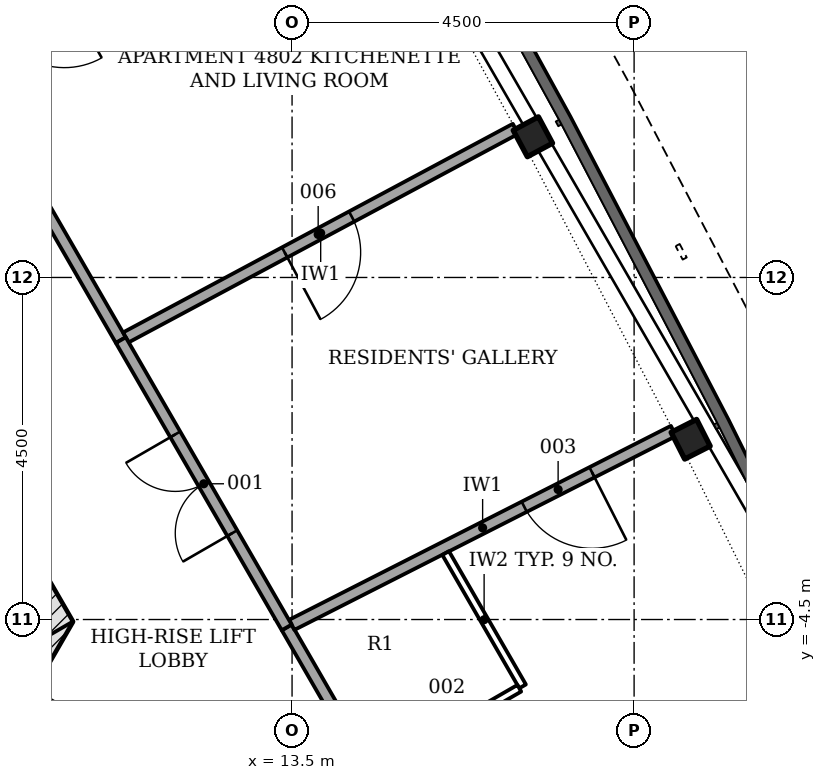
"""IFC4 building model, lengths in metres.
Left out: names, types, materials, properties, quantities, classifications, styles, units other than length and angle.
Written with IfcOpenShell. Run it as: python <this file> out.ifc"""

import sys

from ifc_helpers import new_model, si_unit, direction, frame, frame_2d, origin, origin_2d, place, context, subcontext, project, spatial, rectangle, i_section, extrude, element, fill, save


model = new_model("IFC4")
c1 = context("Model", 3, precision=1e-05, world=origin(), true_north=direction((0.0, 1.0)))
c2 = subcontext(c1, "Body", "Model", "MODEL_VIEW")
j1 = project(units=[si_unit("LENGTHUNIT", "METRE"), si_unit("PLANEANGLEUNIT", "RADIAN")], contexts=[c1])
p1 = place(None, origin())
s1 = spatial("IfcSite", under=j1, at=p1, CompositionType="ELEMENT")
p2 = place(p1, origin())
s2 = spatial("IfcBuilding", under=s1, at=p2, CompositionType="ELEMENT")
p3 = place(p2, frame((0.0, 0.0, 188.7)))
s3 = spatial("IfcBuildingStorey", under=s2, at=p3, CompositionType="ELEMENT", Elevation=188.7)
p4 = place(p3, frame((8.926, -6.753, -0.2), z_axis=(0.0, 0.0, 1.0), x_axis=(0.500042739161, 0.866000726912, 0.0)))
e1 = element("IfcWall", 1, at=p4, inside=s3, PredefinedType="SHEAR", context=c2, shape_type="SweptSolid", body=[
    extrude(rectangle(XDim=2.771, YDim=0.7, at=frame_2d((1.386, 0.0))), origin(), (0.0, 0.0, 1.0), 3.6),
])
p5 = place(p3, frame((10.311, -4.703, -0.2), z_axis=(0.0, 0.0, 1.0), x_axis=(-0.500001446645, 0.866024568562, 0.0)))
e2 = element("IfcWall", 2, at=p5, inside=s3, PredefinedType="SHEAR", context=c2, shape_type="SweptSolid", body=[
    extrude(rectangle(XDim=18.458, YDim=0.7, at=frame_2d((9.229, 0.0))), origin(), (0.0, 0.0, 1.0), 3.6),
])
p6 = place(p5, frame((4.379, 0.0, 0.2)))
e3 = element("IfcOpeningElement", 3, at=p6, cuts=e2, PredefinedType="OPENING", context=c2, shape_type="SweptSolid", body=[
    extrude(rectangle(XDim=1.1, YDim=2.1, at=frame_2d((0.55, 1.05))), frame((0.0, 0.36, 0.0), z_axis=(0.0, -1.0, 0.0), x_axis=(1.0, 0.0, 0.0)), (0.0, 0.0, 1.0), 0.72),
])
p7 = place(p5, frame((6.529, 0.0, 0.2)))
e4 = element("IfcOpeningElement", 4, at=p7, cuts=e2, PredefinedType="OPENING", context=c2, shape_type="SweptSolid", body=[
    extrude(rectangle(XDim=1.1, YDim=2.1, at=frame_2d((0.55, 1.05))), frame((0.0, 0.36, 0.0), z_axis=(0.0, -1.0, 0.0), x_axis=(1.0, 0.0, 0.0)), (0.0, 0.0, 1.0), 0.72),
])
p8 = place(p5, frame((8.679, 0.0, 0.2)))
e5 = element("IfcOpeningElement", 5, at=p8, cuts=e2, PredefinedType="OPENING", context=c2, shape_type="SweptSolid", body=[
    extrude(rectangle(XDim=1.1, YDim=2.1, at=frame_2d((0.55, 1.05))), frame((0.0, 0.36, 0.0), z_axis=(0.0, -1.0, 0.0), x_axis=(1.0, 0.0, 0.0)), (0.0, 0.0, 1.0), 0.72),
])
p9 = place(p5, frame((10.829, 0.0, 0.2)))
e6 = element("IfcOpeningElement", 6, at=p9, cuts=e2, PredefinedType="OPENING", context=c2, shape_type="SweptSolid", body=[
    extrude(rectangle(XDim=1.1, YDim=2.1, at=frame_2d((0.55, 1.05))), frame((0.0, 0.36, 0.0), z_axis=(0.0, -1.0, 0.0), x_axis=(1.0, 0.0, 0.0)), (0.0, 0.0, 1.0), 0.72),
])
p10 = place(p5, frame((12.979, 0.0, 0.2)))
e7 = element("IfcOpeningElement", 7, at=p10, cuts=e2, PredefinedType="OPENING", context=c2, shape_type="SweptSolid", body=[
    extrude(rectangle(XDim=1.1, YDim=2.1, at=frame_2d((0.55, 1.05))), frame((0.0, 0.36, 0.0), z_axis=(0.0, -1.0, 0.0), x_axis=(1.0, 0.0, 0.0)), (0.0, 0.0, 1.0), 0.72),
])
p11 = place(p3, frame((9.922, -5.728, -0.2), z_axis=(0.0, 0.0, 1.0), x_axis=(0.866025463095, -0.499999897272, 0.0)))
e8 = element("IfcWall", 8, at=p11, inside=s3, PredefinedType="SHEAR", context=c2, shape_type="SweptSolid", body=[
    extrude(rectangle(XDim=9.521, YDim=0.7, at=frame_2d((4.761, 0.0))), origin(), (0.0, 0.0, 1.0), 3.6),
])
for number, where, z_axis, x_axis in (
    (9, (18.744, -2.128, -0.2), (0.0, 0.0, 1.0), (-0.453, 0.892, 0.0)),
    (10, (16.668, 1.851, -0.2), (0.0, 0.0, 1.0), (-0.472, 0.882, 0.0)),
):
    element("IfcColumn", number, at=place(p3, frame(where, z_axis=z_axis, x_axis=x_axis)), inside=s3, PredefinedType="COLUMN", context=c2, shape_type="SweptSolid", body=[
        extrude(i_section(OverallWidth=0.394, OverallDepth=0.376, WebThickness=0.017, FlangeThickness=0.028, FilletRadius=0.015, at=origin_2d()), origin(), (0.0, 0.0, 1.0), 3.6),
    ])
p12 = place(p3, frame((15.807, -8.722, 0.0), z_axis=(0.0, 0.0, 1.0), x_axis=(-0.500015802937, 0.866016279763, 0.0)))
e11 = element("IfcWall", 11, at=p12, inside=s3, PredefinedType="PARTITIONING", context=c2, shape_type="SweptSolid", body=[
    extrude(rectangle(XDim=4.755, YDim=0.15, at=frame_2d((2.377, 0.0))), origin(), (0.0, 0.0, 1.0), 2.923),
])
p13 = place(p3, frame((11.247, -0.824, 0.0), z_axis=(0.0, 0.0, 1.0), x_axis=(-0.499997921847, 0.866026603603, 0.0)))
e12 = element("IfcWall", 12, at=p13, inside=s3, PredefinedType="PARTITIONING", context=c2, shape_type="SweptSolid", body=[
    extrude(rectangle(XDim=14.065, YDim=0.15, at=frame_2d((7.032, 0.0))), origin(), (0.0, 0.0, 1.0), 2.852),
])
p14 = place(p13, frame((11.953, 0.0, 0.0)))
e13 = element("IfcOpeningElement", 13, at=p14, cuts=e12, PredefinedType="OPENING", context=c2, shape_type="SweptSolid", body=[
    extrude(rectangle(XDim=1.0, YDim=2.1, at=frame_2d((0.5, 1.05))), frame((0.0, 0.085, 0.0), z_axis=(0.0, -1.0, 0.0), x_axis=(1.0, 0.0, 0.0)), (0.0, 0.0, 1.0), 0.17),
])
p15 = place(p3, frame((18.518, -2.019, 0.0), z_axis=(0.0, 0.0, 1.0), x_axis=(-0.891548029597, -0.452926164978, 0.0)))
e14 = element("IfcWall", 14, at=p15, inside=s3, PredefinedType="PARTITIONING", context=c2, shape_type="SweptSolid", body=[
    extrude(rectangle(XDim=5.632, YDim=0.15, at=frame_2d((2.816, 0.0))), origin(), (0.0, 0.0, 1.0), 2.461),
])
p16 = place(p15, frame((1.202, 0.0, 0.0)))
e15 = element("IfcOpeningElement", 15, at=p16, cuts=e14, PredefinedType="OPENING", context=c2, shape_type="SweptSolid", body=[
    extrude(rectangle(XDim=1.0, YDim=2.1, at=frame_2d((0.5, 1.05))), frame((0.0, 0.085, 0.0), z_axis=(0.0, -1.0, 0.0), x_axis=(1.0, 0.0, 0.0)), (0.0, 0.0, 1.0), 0.17),
])
p17 = place(p3, frame((16.44, 1.956, 0.0), z_axis=(0.0, 0.0, 1.0), x_axis=(-0.881627849584, -0.471945266783, 0.0)))
e16 = element("IfcWall", 16, at=p17, inside=s3, PredefinedType="PARTITIONING", context=c2, shape_type="SweptSolid", body=[
    extrude(rectangle(XDim=5.815, YDim=0.15, at=frame_2d((2.907, 0.0))), origin(), (0.0, 0.0, 1.0), 2.461),
])
p18 = place(p17, frame((2.445, 0.0, 0.0)))
e17 = element("IfcOpeningElement", 17, at=p18, cuts=e16, PredefinedType="OPENING", context=c2, shape_type="SweptSolid", body=[
    extrude(rectangle(XDim=1.0, YDim=2.1, at=frame_2d((0.5, 1.05))), frame((0.0, 0.085, 0.0), z_axis=(0.0, -1.0, 0.0), x_axis=(1.0, 0.0, 0.0)), (0.0, 0.0, 1.0), 0.17),
])
p19 = place(p3, frame((13.429, -4.604, 0.0), z_axis=(0.0, 0.0, 1.0), x_axis=(-0.499995208485, 0.866028170149, 0.0)))
e18 = element("IfcWall", 18, at=p19, inside=s3, PredefinedType="PARTITIONING", context=c2, shape_type="SweptSolid", body=[
    extrude(rectangle(XDim=4.365, YDim=0.15, at=frame_2d((2.182, 0.0))), origin(), (0.0, 0.0, 1.0), 2.852),
])
p20 = place(p19, frame((1.432, 0.0, 0.0)))
e19 = element("IfcOpeningElement", 19, at=p20, cuts=e18, PredefinedType="OPENING", context=c2, shape_type="SweptSolid", body=[
    extrude(rectangle(XDim=1.5, YDim=2.1, at=frame_2d((0.75, 1.05))), frame((0.0, 0.085, 0.0), z_axis=(0.0, -1.0, 0.0), x_axis=(1.0, 0.0, 0.0)), (0.0, 0.0, 1.0), 0.17),
])
p21 = place(p3, frame((15.521, -3.626, 0.0), z_axis=(0.0, 0.0, 1.0), x_axis=(0.500042536776, -0.866000843773, 0.0)))
e20 = element("IfcWall", 20, at=p21, inside=s3, PredefinedType="PARTITIONING", context=c2, shape_type="SweptSolid", body=[
    extrude(rectangle(XDim=2.025, YDim=0.1, at=frame_2d((1.012, 0.0))), origin(), (0.0, 0.0, 1.0), 3.4),
])
p22 = place(p3, frame((16.49, -5.405, 0.0), z_axis=(0.0, 0.0, 1.0), x_axis=(-0.866065968399, -0.499929733443, 0.0)))
e21 = element("IfcWall", 21, at=p22, inside=s3, PredefinedType="PARTITIONING", context=c2, shape_type="SweptSolid", body=[
    extrude(rectangle(XDim=2.175, YDim=0.1, at=frame_2d((1.087, 0.0))), origin(), (0.0, 0.0, 1.0), 3.4),
])
p23 = place(p22, frame((0.6, 0.0, 0.0)))
e22 = element("IfcOpeningElement", 22, at=p23, cuts=e21, PredefinedType="OPENING", context=c2, shape_type="SweptSolid", body=[
    extrude(rectangle(XDim=1.0, YDim=2.1, at=frame_2d((0.5, 1.05))), frame((0.0, 0.06, 0.0), z_axis=(0.0, -1.0, 0.0), x_axis=(1.0, 0.0, 0.0)), (0.0, 0.0, 1.0), 0.12),
])
p24 = place(p3, frame((14.277, 5.885, 0.0), z_axis=(0.0, 0.0, 1.0), x_axis=(-0.871335785584, -0.490687220907, 0.0)))
e23 = element("IfcWall", 23, at=p24, inside=s3, PredefinedType="PARTITIONING", context=c2, shape_type="SweptSolid", body=[
    extrude(rectangle(XDim=5.904, YDim=0.1, at=frame_2d((2.952, 0.0))), origin(), (0.0, 0.0, 1.0), 2.461),
])
p25 = place(p24, frame((1.339, 0.0, 0.0)))
e24 = element("IfcOpeningElement", 24, at=p25, cuts=e23, PredefinedType="OPENING", context=c2, shape_type="SweptSolid", body=[
    extrude(rectangle(XDim=1.0, YDim=2.1, at=frame_2d((0.5, 1.05))), frame((0.0, 0.06, 0.0), z_axis=(0.0, -1.0, 0.0), x_axis=(1.0, 0.0, 0.0)), (0.0, 0.0, 1.0), 0.12),
])
p26 = place(p24, frame((4.329, 0.0, 0.0)))
e25 = element("IfcOpeningElement", 25, at=p26, cuts=e23, PredefinedType="OPENING", context=c2, shape_type="SweptSolid", body=[
    extrude(rectangle(XDim=1.0, YDim=2.1, at=frame_2d((0.5, 1.05))), frame((0.0, 0.06, 0.0), z_axis=(0.0, -1.0, 0.0), x_axis=(1.0, 0.0, 0.0)), (0.0, 0.0, 1.0), 0.12),
])
p27 = place(p20, origin())
e26 = element("IfcDoor", 26, at=p27, inside=s3, OperationType="DOUBLE_DOOR_SINGLE_SWING", PredefinedType="DOOR", context=c2, shape_type="SweptSolid", body=[
    extrude(rectangle(XDim=1.5, YDim=2.1, at=frame_2d((0.75, 1.05))), frame((0.0, 0.025, 0.0), z_axis=(0.0, -1.0, 0.0), x_axis=(1.0, 0.0, 0.0)), (0.0, 0.0, 1.0), 0.05),
])
fill(e19, e26)
p28 = place(p16, origin())
e27 = element("IfcDoor", 27, at=p28, inside=s3, OperationType="SINGLE_SWING_LEFT", PredefinedType="DOOR", context=c2, shape_type="SweptSolid", body=[
    extrude(rectangle(XDim=1.0, YDim=2.1, at=frame_2d((0.5, 1.05))), frame((0.0, 0.025, 0.0), z_axis=(0.0, -1.0, 0.0), x_axis=(1.0, 0.0, 0.0)), (0.0, 0.0, 1.0), 0.05),
])
fill(e15, e27)
p29 = place(p18, origin())
e28 = element("IfcDoor", 28, at=p29, inside=s3, OperationType="SINGLE_SWING_RIGHT", PredefinedType="DOOR", context=c2, shape_type="SweptSolid", body=[
    extrude(rectangle(XDim=1.0, YDim=2.1, at=frame_2d((0.5, 1.05))), frame((0.0, 0.025, 0.0), z_axis=(0.0, -1.0, 0.0), x_axis=(1.0, 0.0, 0.0)), (0.0, 0.0, 1.0), 0.05),
])
fill(e17, e28)
save(model, sys.argv[1])
